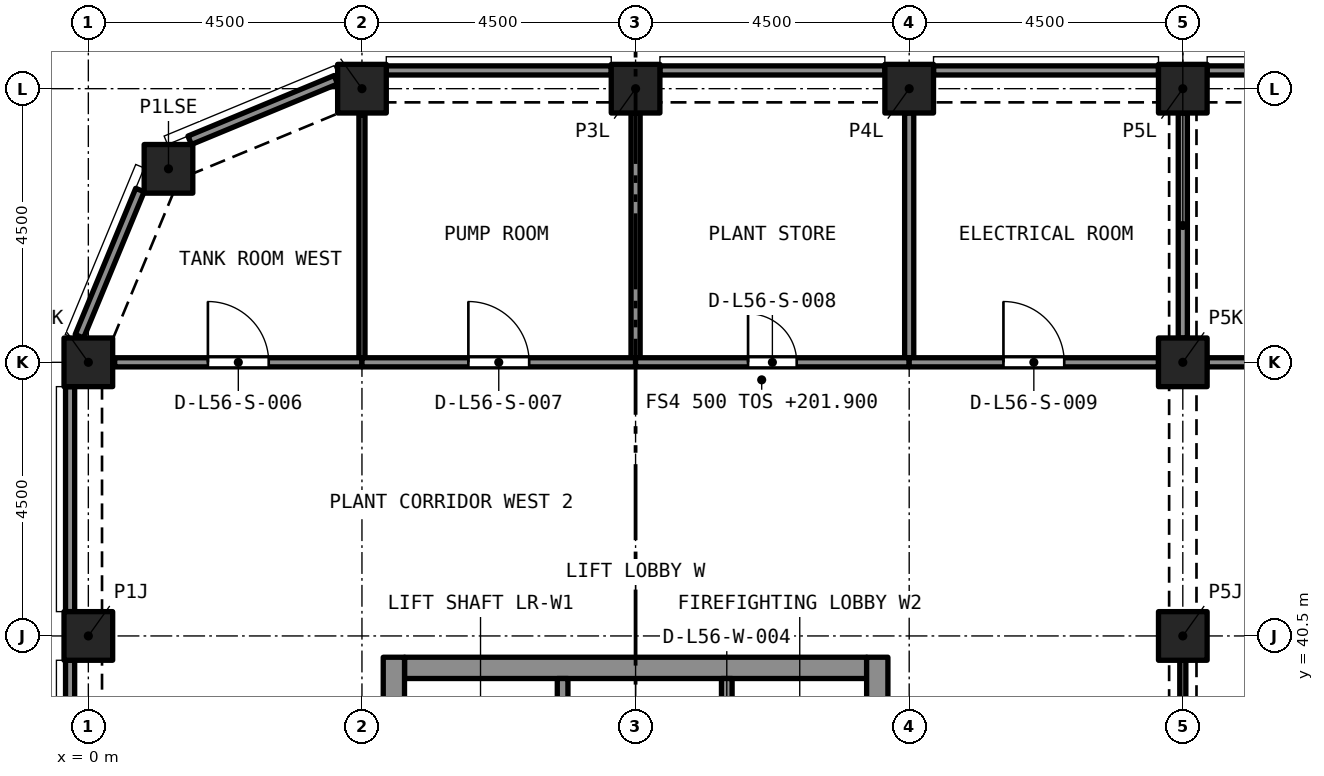
"""IFC4 building model, lengths in metres.
Left out: names, types, materials, properties, quantities, classifications, styles, units other than length and angle.
Written with IfcOpenShell. Run it as: python <this file> out.ifc"""

import sys

from ifc_helpers import new_model, si_unit, direction, frame, frame_2d, origin, origin_2d, place, context, subcontext, project, spatial, rectangle, extrude, element, fill, save


model = new_model("IFC4")
c1 = context("Model", 3, precision=1e-05, world=origin(), true_north=direction((0.0, 1.0)))
c2 = subcontext(c1, "Body", "Model", "MODEL_VIEW")
j1 = project(units=[si_unit("LENGTHUNIT", "METRE"), si_unit("PLANEANGLEUNIT", "RADIAN")], contexts=[c1])
p1 = place(None, origin())
s1 = spatial("IfcSite", under=j1, at=p1, CompositionType="ELEMENT")
p2 = place(p1, origin())
s2 = spatial("IfcBuilding", under=s1, at=p2, CompositionType="ELEMENT")
p3 = place(p2, frame((0.0, 0.0, 201.9)))
s3 = spatial("IfcBuildingStorey", under=s2, at=p3, CompositionType="ELEMENT", Elevation=201.9)
for number, where, z_axis, x_axis in (
    (1, (0.0, 40.5, 0.0), (0.0, 0.0, 1.0), (1.0, 0.0, 0.0)),
    (2, (18.0, 40.5, 0.0), (0.0, 0.0, 1.0), (1.0, 0.0, 0.0)),
    (3, (0.0, 45.0, 0.0), (0.0, 0.0, 1.0), (1.0, 0.0, 0.0)),
    (4, (18.0, 45.0, 0.0), (0.0, 0.0, 1.0), (1.0, 0.0, 0.0)),
    (5, (1.318, 48.182, 0.0), (0.0, 0.0, 1.0), (1.0, 0.0, 0.0)),
    (6, (4.5, 49.5, 0.0), (0.0, 0.0, 1.0), (1.0, 0.0, 0.0)),
    (7, (9.0, 49.5, 0.0), (0.0, 0.0, 1.0), (1.0, 0.0, 0.0)),
    (8, (13.5, 49.5, 0.0), (0.0, 0.0, 1.0), (1.0, 0.0, 0.0)),
    (9, (18.0, 49.5, 0.0), (0.0, 0.0, 1.0), (1.0, 0.0, 0.0)),
):
    element("IfcColumn", number, at=place(p3, frame(where, z_axis=z_axis, x_axis=x_axis)), inside=s3, PredefinedType="COLUMN", context=c2, shape_type="SweptSolid", body=[
        extrude(rectangle(XDim=0.8, YDim=0.8, at=origin_2d()), origin(), (0.0, 0.0, 1.0), 4.995),
    ])
p4 = place(p3, frame((5.2, 39.975, 0.0), z_axis=(0.0, 0.0, 1.0), x_axis=(1.0, 0.0, 0.0)))
e10 = element("IfcWall", 10, at=p4, inside=s3, PredefinedType="SOLIDWALL", context=c2, shape_type="SweptSolid", body=[
    extrude(rectangle(XDim=7.6, YDim=0.35, at=frame_2d((3.8, 0.0))), origin(), (0.0, 0.0, 1.0), 4.995),
])
p5 = place(p3, frame((5.025, 27.35, 0.0), z_axis=(0.0, 0.0, 1.0), x_axis=(0.0, 1.0, 0.0)))
e11 = element("IfcWall", 11, at=p5, inside=s3, PredefinedType="SOLIDWALL", context=c2, shape_type="SweptSolid", body=[
    extrude(rectangle(XDim=12.8, YDim=0.35, at=frame_2d((6.4, 0.0))), origin(), (0.0, 0.0, 1.0), 4.995),
])
p6 = place(p5, frame((8.6, 0.0, 0.0)))
e12 = element("IfcOpeningElement", 12, at=p6, cuts=e11, PredefinedType="OPENING", context=c2, shape_type="SweptSolid", body=[
    extrude(rectangle(XDim=1.2, YDim=2.1, at=frame_2d((0.6, 1.05))), frame((0.0, 0.185, 0.0), z_axis=(0.0, -1.0, 0.0), x_axis=(1.0, 0.0, 0.0)), (0.0, 0.0, 1.0), 0.37),
])
p7 = place(p3, frame((12.975, 27.35, 0.0), z_axis=(0.0, 0.0, 1.0), x_axis=(0.0, 1.0, 0.0)))
e13 = element("IfcWall", 13, at=p7, inside=s3, PredefinedType="SOLIDWALL", context=c2, shape_type="SweptSolid", body=[
    extrude(rectangle(XDim=12.8, YDim=0.35, at=frame_2d((6.4, 0.0))), origin(), (0.0, 0.0, 1.0), 4.995),
])
p8 = place(p7, frame((10.75, 0.0, 0.0)))
e14 = element("IfcOpeningElement", 14, at=p8, cuts=e13, PredefinedType="OPENING", context=c2, shape_type="SweptSolid", body=[
    extrude(rectangle(XDim=1.1, YDim=2.1, at=frame_2d((0.55, 1.05))), frame((0.0, 0.185, 0.0), z_axis=(0.0, -1.0, 0.0), x_axis=(1.0, 0.0, 0.0)), (0.0, 0.0, 1.0), 0.37),
])
p9 = place(p7, frame((8.6, 0.0, 0.0)))
e15 = element("IfcOpeningElement", 15, at=p9, cuts=e13, PredefinedType="OPENING", context=c2, shape_type="SweptSolid", body=[
    extrude(rectangle(XDim=1.2, YDim=2.1, at=frame_2d((0.6, 1.05))), frame((0.0, 0.185, 0.0), z_axis=(0.0, -1.0, 0.0), x_axis=(1.0, 0.0, 0.0)), (0.0, 0.0, 1.0), 0.37),
])
for number, where, z_axis, x_axis in (
    (16, (18.4, 49.8, 0.0), (0.0, 0.0, 1.0), (1.0, 0.0, 0.0)),
    (17, (13.9, 49.8, 0.0), (0.0, 0.0, 1.0), (1.0, 0.0, 0.0)),
    (18, (9.4, 49.8, 0.0), (0.0, 0.0, 1.0), (1.0, 0.0, 0.0)),
    (19, (4.9, 49.8, 0.0), (0.0, 0.0, 1.0), (1.0, 0.0, 0.0)),
):
    element("IfcWall", number, at=place(p3, frame(where, z_axis=z_axis, x_axis=x_axis)), inside=s3, PredefinedType="SOLIDWALL", context=c2, shape_type="SweptSolid", body=[
        extrude(rectangle(XDim=3.7, YDim=0.15, at=frame_2d((1.85, 0.0))), origin(), (0.0, 0.0, 1.0), 4.995),
    ])
for number, where, z_axis, x_axis in (
    (20, (1.667, 48.651, 0.0), (0.0, 0.0, 1.0), (0.924, 0.383, 0.0)),
    (21, (-0.147, 45.429, 0.0), (0.0, 0.0, 1.0), (0.383, 0.924, 0.0)),
):
    element("IfcWall", number, at=place(p3, frame(where, z_axis=z_axis, x_axis=x_axis)), inside=s3, PredefinedType="SOLIDWALL", context=c2, shape_type="SweptSolid", body=[
        extrude(rectangle(XDim=2.602, YDim=0.15, at=frame_2d((1.301, 0.0))), origin(), (0.0, 0.0, 1.0), 4.995),
    ])
for number, where, z_axis, x_axis in (
    (22, (-0.3, 40.9, 0.0), (0.0, 0.0, 1.0), (0.0, 1.0, 0.0)),
    (23, (-0.3, 36.4, 0.0), (0.0, 0.0, 1.0), (0.0, 1.0, 0.0)),
):
    element("IfcWall", number, at=place(p3, frame(where, z_axis=z_axis, x_axis=x_axis)), inside=s3, PredefinedType="SOLIDWALL", context=c2, shape_type="SweptSolid", body=[
        extrude(rectangle(XDim=3.7, YDim=0.15, at=frame_2d((1.85, 0.0))), origin(), (0.0, 0.0, 1.0), 4.995),
    ])
p10 = place(p3, frame((7.8, 37.5, 0.0), z_axis=(0.0, 0.0, 1.0), x_axis=(0.0, 1.0, 0.0)))
e24 = element("IfcWall", 24, at=p10, inside=s3, PredefinedType="SOLIDWALL", context=c2, shape_type="SweptSolid", body=[
    extrude(rectangle(XDim=2.3, YDim=0.175, at=frame_2d((1.15, 0.0))), origin(), (0.0, 0.0, 1.0), 4.695),
])
p11 = place(p3, frame((10.5, 37.5, 0.0), z_axis=(0.0, 0.0, 1.0), x_axis=(0.0, 1.0, 0.0)))
e25 = element("IfcWall", 25, at=p11, inside=s3, PredefinedType="SOLIDWALL", context=c2, shape_type="SweptSolid", body=[
    extrude(rectangle(XDim=2.3, YDim=0.175, at=frame_2d((1.15, 0.0))), origin(), (0.0, 0.0, 1.0), 4.695),
])
p12 = place(p11, frame((0.65, 0.0, 0.0)))
e26 = element("IfcOpeningElement", 26, at=p12, cuts=e25, PredefinedType="OPENING", context=c2, shape_type="SweptSolid", body=[
    extrude(rectangle(XDim=1.0, YDim=2.1, at=frame_2d((0.5, 1.05))), frame((0.0, 0.097, 0.0), z_axis=(0.0, -1.0, 0.0), x_axis=(1.0, 0.0, 0.0)), (0.0, 0.0, 1.0), 0.195),
])
p13 = place(p3, frame((18.0, 36.4, 0.0), z_axis=(0.0, 0.0, 1.0), x_axis=(0.0, 1.0, 0.0)))
e27 = element("IfcWall", 27, at=p13, inside=s3, PredefinedType="PARTITIONING", context=c2, shape_type="SweptSolid", body=[
    extrude(rectangle(XDim=3.7, YDim=0.1, at=frame_2d((1.85, 0.0))), origin(), (0.0, 0.0, 1.0), 4.175),
])
p14 = place(p3, frame((18.4, 45.0, 0.0), z_axis=(0.0, 0.0, 1.0), x_axis=(1.0, 0.0, 0.0)))
e28 = element("IfcWall", 28, at=p14, inside=s3, PredefinedType="PARTITIONING", context=c2, shape_type="SweptSolid", body=[
    extrude(rectangle(XDim=8.6, YDim=0.15, at=frame_2d((4.3, 0.0))), origin(), (0.0, 0.0, 1.0), 4.545),
])
p15 = place(p14, frame((3.55, 0.0, 0.0)))
e29 = element("IfcOpeningElement", 29, at=p15, cuts=e28, PredefinedType="OPENING", context=c2, shape_type="SweptSolid", body=[
    extrude(rectangle(XDim=1.5, YDim=2.4, at=frame_2d((0.75, 1.2))), frame((0.0, 0.085, 0.0), z_axis=(0.0, -1.0, 0.0), x_axis=(1.0, 0.0, 0.0)), (0.0, 0.0, 1.0), 0.17),
])
p16 = place(p3, frame((18.0, 45.4, 0.0), z_axis=(0.0, 0.0, 1.0), x_axis=(0.0, 1.0, 0.0)))
e30 = element("IfcWall", 30, at=p16, inside=s3, PredefinedType="PARTITIONING", context=c2, shape_type="SweptSolid", body=[
    extrude(rectangle(XDim=3.7, YDim=0.15, at=frame_2d((1.85, 0.0))), origin(), (0.0, 0.0, 1.0), 4.175),
])
p17 = place(p3, frame((4.5, 45.075, 0.0), z_axis=(0.0, 0.0, 1.0), x_axis=(0.0, 1.0, 0.0)))
e31 = element("IfcWall", 31, at=p17, inside=s3, PredefinedType="PARTITIONING", context=c2, shape_type="SweptSolid", body=[
    extrude(rectangle(XDim=3.992, YDim=0.1, at=frame_2d((1.996, 0.0))), origin(), (0.0, 0.0, 1.0), 4.695),
])
p18 = place(p3, frame((0.433, 45.0, 0.0), z_axis=(0.0, 0.0, 1.0), x_axis=(1.0, 0.0, 0.0)))
e32 = element("IfcWall", 32, at=p18, inside=s3, PredefinedType="PARTITIONING", context=c2, shape_type="SweptSolid", body=[
    extrude(rectangle(XDim=4.067, YDim=0.15, at=frame_2d((2.034, 0.0))), origin(), (0.0, 0.0, 1.0), 4.695),
])
p19 = place(p18, frame((1.533, 0.0, 0.0)))
e33 = element("IfcOpeningElement", 33, at=p19, cuts=e32, PredefinedType="OPENING", context=c2, shape_type="SweptSolid", body=[
    extrude(rectangle(XDim=1.0, YDim=2.1, at=frame_2d((0.5, 1.05))), frame((0.0, 0.085, 0.0), z_axis=(0.0, -1.0, 0.0), x_axis=(1.0, 0.0, 0.0)), (0.0, 0.0, 1.0), 0.17),
])
p20 = place(p3, frame((9.0, 45.075, 0.0), z_axis=(0.0, 0.0, 1.0), x_axis=(0.0, 1.0, 0.0)))
e34 = element("IfcWall", 34, at=p20, inside=s3, PredefinedType="PARTITIONING", context=c2, shape_type="SweptSolid", body=[
    extrude(rectangle(XDim=4.025, YDim=0.15, at=frame_2d((2.013, 0.0))), origin(), (0.0, 0.0, 1.0), 4.695),
])
p21 = place(p3, frame((4.5, 45.0, 0.0), z_axis=(0.0, 0.0, 1.0), x_axis=(1.0, 0.0, 0.0)))
e35 = element("IfcWall", 35, at=p21, inside=s3, PredefinedType="PARTITIONING", context=c2, shape_type="SweptSolid", body=[
    extrude(rectangle(XDim=4.5, YDim=0.15, at=frame_2d((2.25, 0.0))), origin(), (0.0, 0.0, 1.0), 4.695),
])
p22 = place(p21, frame((1.75, 0.0, 0.0)))
e36 = element("IfcOpeningElement", 36, at=p22, cuts=e35, PredefinedType="OPENING", context=c2, shape_type="SweptSolid", body=[
    extrude(rectangle(XDim=1.0, YDim=2.1, at=frame_2d((0.5, 1.05))), frame((0.0, 0.085, 0.0), z_axis=(0.0, -1.0, 0.0), x_axis=(1.0, 0.0, 0.0)), (0.0, 0.0, 1.0), 0.17),
])
p23 = place(p3, frame((13.5, 45.075, 0.0), z_axis=(0.0, 0.0, 1.0), x_axis=(0.0, 1.0, 0.0)))
e37 = element("IfcWall", 37, at=p23, inside=s3, PredefinedType="PARTITIONING", context=c2, shape_type="SweptSolid", body=[
    extrude(rectangle(XDim=4.025, YDim=0.15, at=frame_2d((2.013, 0.0))), origin(), (0.0, 0.0, 1.0), 4.695),
])
p24 = place(p3, frame((9.0, 45.0, 0.0), z_axis=(0.0, 0.0, 1.0), x_axis=(1.0, 0.0, 0.0)))
e38 = element("IfcWall", 38, at=p24, inside=s3, PredefinedType="PARTITIONING", context=c2, shape_type="SweptSolid", body=[
    extrude(rectangle(XDim=4.5, YDim=0.15, at=frame_2d((2.25, 0.0))), origin(), (0.0, 0.0, 1.0), 4.695),
])
p25 = place(p24, frame((1.85, 0.0, 0.0)))
e39 = element("IfcOpeningElement", 39, at=p25, cuts=e38, PredefinedType="OPENING", context=c2, shape_type="SweptSolid", body=[
    extrude(rectangle(XDim=0.8, YDim=2.1, at=frame_2d((0.4, 1.05))), frame((0.0, 0.085, 0.0), z_axis=(0.0, -1.0, 0.0), x_axis=(1.0, 0.0, 0.0)), (0.0, 0.0, 1.0), 0.17),
])
p26 = place(p3, frame((13.5, 45.0, 0.0), z_axis=(0.0, 0.0, 1.0), x_axis=(1.0, 0.0, 0.0)))
e40 = element("IfcWall", 40, at=p26, inside=s3, PredefinedType="PARTITIONING", context=c2, shape_type="SweptSolid", body=[
    extrude(rectangle(XDim=4.1, YDim=0.15, at=frame_2d((2.05, 0.0))), origin(), (0.0, 0.0, 1.0), 4.695),
])
p27 = place(p26, frame((1.55, 0.0, 0.0)))
e41 = element("IfcOpeningElement", 41, at=p27, cuts=e40, PredefinedType="OPENING", context=c2, shape_type="SweptSolid", body=[
    extrude(rectangle(XDim=1.0, YDim=2.1, at=frame_2d((0.5, 1.05))), frame((0.0, 0.085, 0.0), z_axis=(0.0, -1.0, 0.0), x_axis=(1.0, 0.0, 0.0)), (0.0, 0.0, 1.0), 0.17),
])
p28 = place(p19, origin())
e42 = element("IfcDoor", 42, at=p28, inside=s3, OperationType="SINGLE_SWING_RIGHT", PredefinedType="DOOR", context=c2, shape_type="SweptSolid", body=[
    extrude(rectangle(XDim=1.0, YDim=2.1, at=frame_2d((0.5, 1.05))), frame((0.0, 0.025, 0.0), z_axis=(0.0, -1.0, 0.0), x_axis=(1.0, 0.0, 0.0)), (0.0, 0.0, 1.0), 0.05),
])
fill(e33, e42)
p29 = place(p22, origin())
e43 = element("IfcDoor", 43, at=p29, inside=s3, OperationType="SINGLE_SWING_RIGHT", PredefinedType="DOOR", context=c2, shape_type="SweptSolid", body=[
    extrude(rectangle(XDim=1.0, YDim=2.1, at=frame_2d((0.5, 1.05))), frame((0.0, 0.025, 0.0), z_axis=(0.0, -1.0, 0.0), x_axis=(1.0, 0.0, 0.0)), (0.0, 0.0, 1.0), 0.05),
])
fill(e36, e43)
p30 = place(p25, origin())
e44 = element("IfcDoor", 44, at=p30, inside=s3, OperationType="SINGLE_SWING_RIGHT", PredefinedType="DOOR", context=c2, shape_type="SweptSolid", body=[
    extrude(rectangle(XDim=0.8, YDim=2.1, at=frame_2d((0.4, 1.05))), frame((0.0, 0.025, 0.0), z_axis=(0.0, -1.0, 0.0), x_axis=(1.0, 0.0, 0.0)), (0.0, 0.0, 1.0), 0.05),
])
fill(e39, e44)
p31 = place(p27, origin())
e45 = element("IfcDoor", 45, at=p31, inside=s3, OperationType="SINGLE_SWING_RIGHT", PredefinedType="DOOR", context=c2, shape_type="SweptSolid", body=[
    extrude(rectangle(XDim=1.0, YDim=2.1, at=frame_2d((0.5, 1.05))), frame((0.0, 0.025, 0.0), z_axis=(0.0, -1.0, 0.0), x_axis=(1.0, 0.0, 0.0)), (0.0, 0.0, 1.0), 0.05),
])
fill(e41, e45)
save(model, sys.argv[1])
